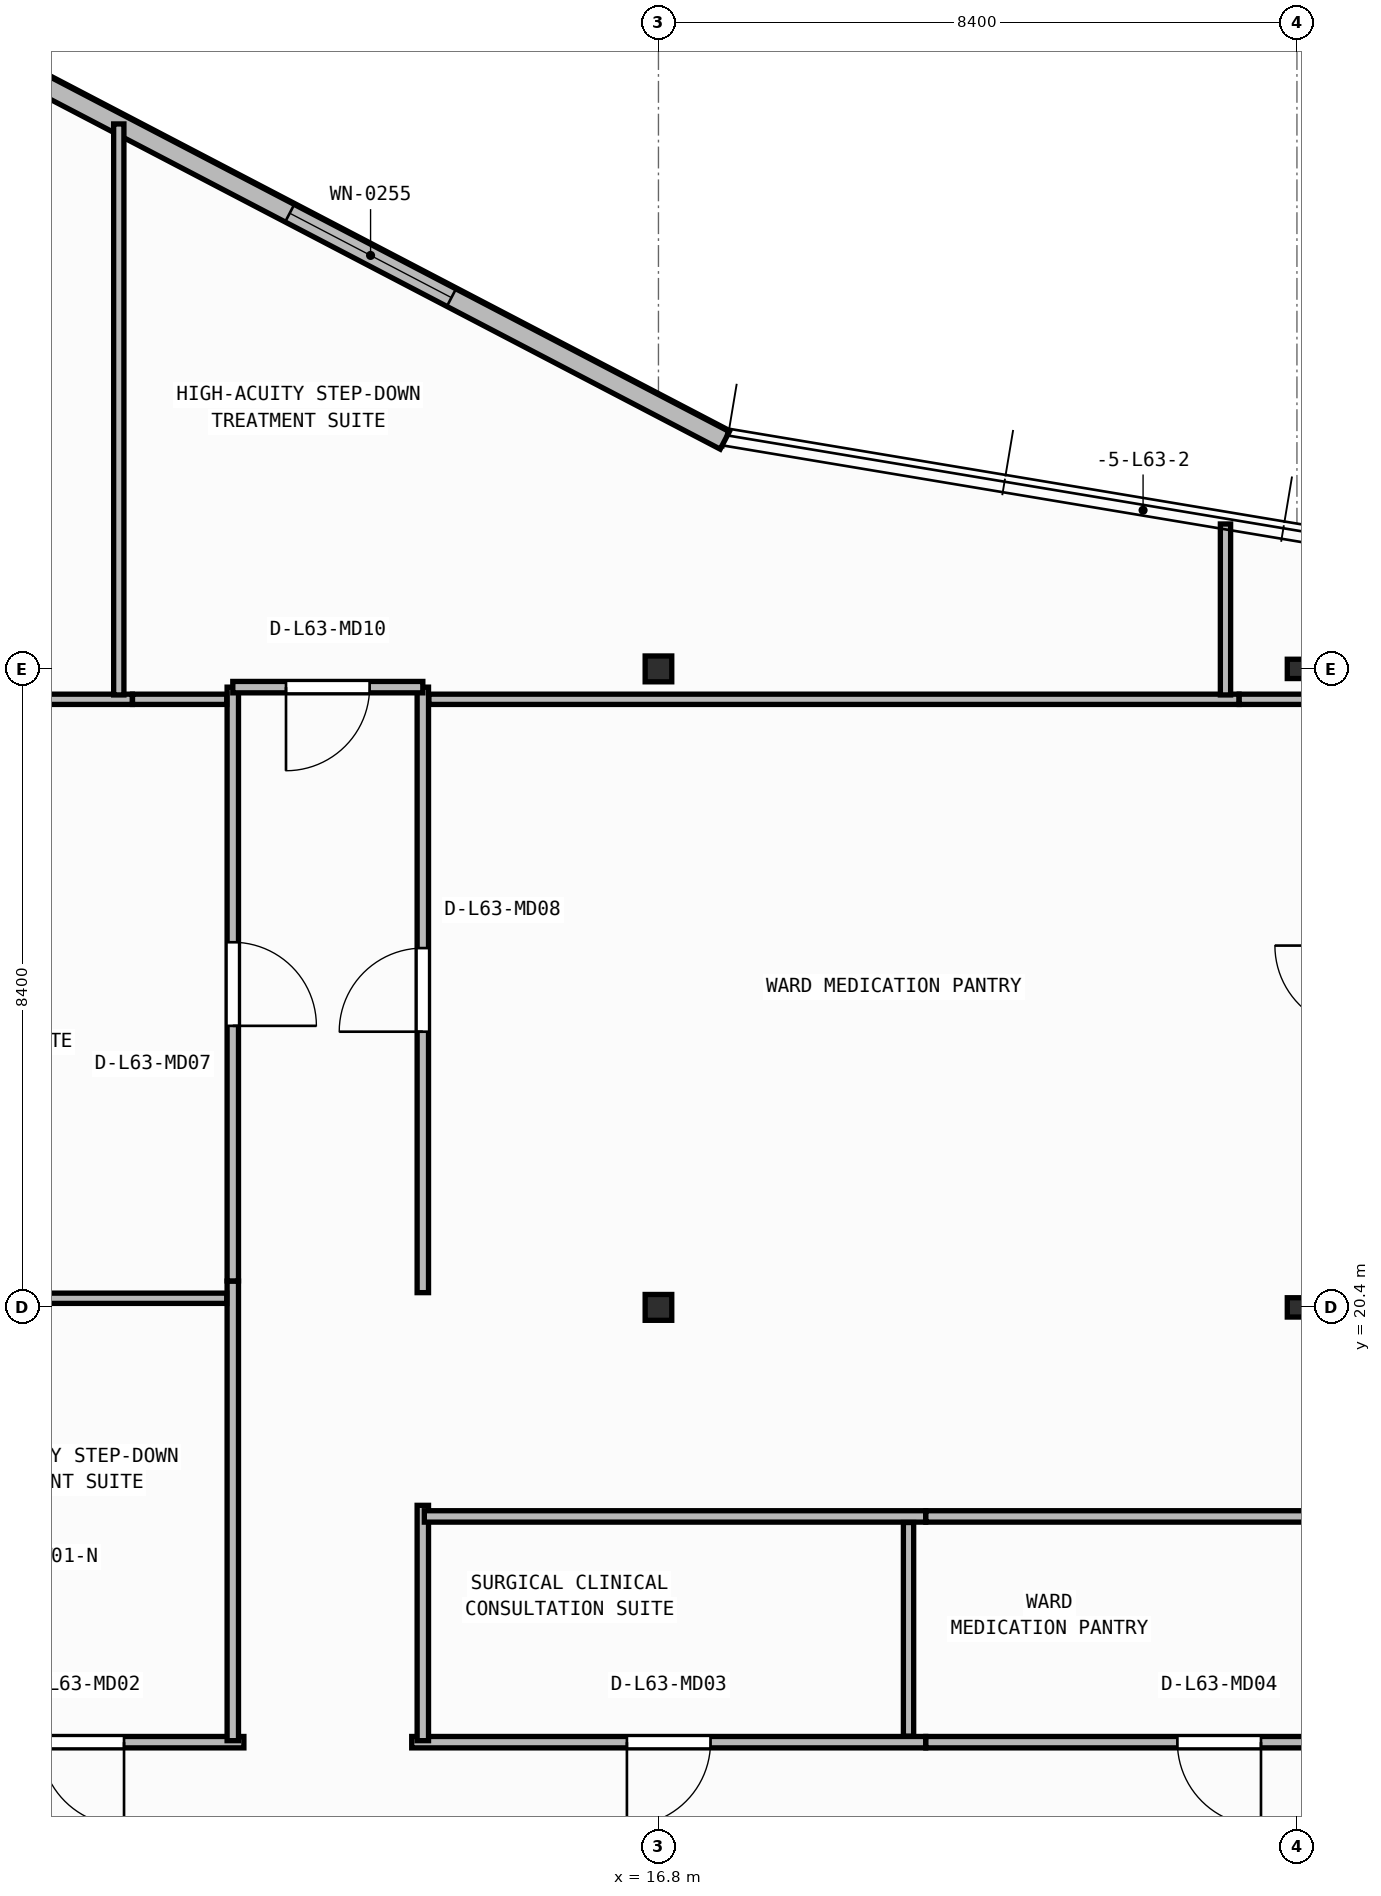
"""IFC4 building model, lengths in metres.
Left out: names, types, materials, properties, quantities, classifications, styles, units other than length and angle.
Written with IfcOpenShell. Run it as: python <this file> out.ifc"""

import sys

from ifc_helpers import new_model, si_unit, direction, frame, frame_2d, origin, origin_2d, place, context, subcontext, project, spatial, rectangle, i_section, extrude, element, fill, save


model = new_model("IFC4")
c1 = context("Model", 3, precision=1e-05, world=origin(), true_north=direction((0.0, 1.0)))
c2 = subcontext(c1, "Body", "Model", "MODEL_VIEW")
j1 = project(units=[si_unit("LENGTHUNIT", "METRE"), si_unit("PLANEANGLEUNIT", "RADIAN")], contexts=[c1])
p1 = place(None, origin())
s1 = spatial("IfcSite", under=j1, at=p1, CompositionType="ELEMENT")
p2 = place(p1, origin())
s2 = spatial("IfcBuilding", under=s1, at=p2, CompositionType="ELEMENT")
p3 = place(p2, frame((0.0, 0.0, 256.55)))
s3 = spatial("IfcBuildingStorey", under=s2, at=p3, CompositionType="ELEMENT", Elevation=256.55)
p4 = place(p3, frame((16.8, 20.4, 0.0), z_axis=(0.0, 0.0, 1.0), x_axis=(1.0, 0.0, 0.0)))
e1 = element("IfcColumn", 1, at=p4, inside=s3, PredefinedType="COLUMN", context=c2, shape_type="SweptSolid", body=[
    extrude(i_section(OverallWidth=0.35, OverallDepth=0.34, WebThickness=0.016, FlangeThickness=0.028, at=origin_2d()), origin(), (0.0, 0.0, 1.0), 3.95),
])
p5 = place(p3, frame((25.2, 20.4, 0.0), z_axis=(0.0, 0.0, 1.0), x_axis=(1.0, 0.0, 0.0)))
e2 = element("IfcColumn", 2, at=p5, inside=s3, PredefinedType="COLUMN", context=c2, shape_type="SweptSolid", body=[
    extrude(i_section(OverallWidth=0.254, OverallDepth=0.254, WebThickness=0.009, FlangeThickness=0.014, FilletRadius=0.013, at=origin_2d()), origin(), (0.0, 0.0, 1.0), 3.95),
])
p6 = place(p3, frame((16.8, 28.8, 0.0), z_axis=(0.0, 0.0, 1.0), x_axis=(1.0, 0.0, 0.0)))
e3 = element("IfcColumn", 3, at=p6, inside=s3, PredefinedType="COLUMN", context=c2, shape_type="SweptSolid", body=[
    extrude(i_section(OverallWidth=0.35, OverallDepth=0.34, WebThickness=0.016, FlangeThickness=0.028, at=origin_2d()), origin(), (0.0, 0.0, 1.0), 3.95),
])
p7 = place(p3, frame((25.2, 28.8, 0.0), z_axis=(0.0, 0.0, 1.0), x_axis=(1.0, 0.0, 0.0)))
e4 = element("IfcColumn", 4, at=p7, inside=s3, PredefinedType="COLUMN", context=c2, shape_type="SweptSolid", body=[
    extrude(i_section(OverallWidth=0.254, OverallDepth=0.254, WebThickness=0.009, FlangeThickness=0.014, FilletRadius=0.013, at=origin_2d()), origin(), (0.0, 0.0, 1.0), 3.95),
])
p8 = place(p3, frame((17.673, 31.806, 0.0), z_axis=(0.0, 0.0, 1.0), x_axis=(-0.886426635565, 0.462869117311, 0.0)))
e5 = element("IfcWall", 5, at=p8, inside=s3, PredefinedType="STANDARD", context=c2, shape_type="SweptSolid", body=[
    extrude(rectangle(XDim=10.514, YDim=0.26, at=frame_2d((5.257, 0.0))), origin(), (0.0, 0.0, 1.0), 3.71),
])
p9 = place(p8, frame((4.057, 0.0, 0.9)))
e6 = element("IfcOpeningElement", 6, at=p9, cuts=e5, PredefinedType="OPENING", context=c2, shape_type="SweptSolid", body=[
    extrude(rectangle(XDim=2.4, YDim=1.65, at=frame_2d((1.2, 0.825))), frame((0.0, 0.14, 0.0), z_axis=(0.0, -1.0, 0.0), x_axis=(1.0, 0.0, 0.0)), (0.0, 0.0, 1.0), 0.28),
])
p10 = place(p3, frame((11.346, 14.68, 0.0), z_axis=(0.0, 0.0, 1.0), x_axis=(-1.0, 0.0, 0.0)))
e7 = element("IfcWall", 7, at=p10, inside=s3, PredefinedType="PARTITIONING", context=c2, shape_type="SweptSolid", body=[
    extrude(rectangle(XDim=4.254, YDim=0.15, at=frame_2d((2.127, 0.0))), origin(), (0.0, 0.0, 1.0), 3.71),
])
p11 = place(p10, frame((1.577, 0.0, 0.0)))
e8 = element("IfcOpeningElement", 8, at=p11, cuts=e7, PredefinedType="OPENING", context=c2, shape_type="SweptSolid", body=[
    extrude(rectangle(XDim=1.1, YDim=2.1, at=frame_2d((0.55, 1.05))), frame((0.0, 0.085, 0.0), z_axis=(0.0, -1.0, 0.0), x_axis=(1.0, 0.0, 0.0)), (0.0, 0.0, 1.0), 0.17),
])
p12 = place(p3, frame((20.316, 14.68, 0.0), z_axis=(0.0, 0.0, 1.0), x_axis=(-1.0, 0.0, 0.0)))
e9 = element("IfcWall", 9, at=p12, inside=s3, PredefinedType="PARTITIONING", context=c2, shape_type="SweptSolid", body=[
    extrude(rectangle(XDim=6.762, YDim=0.15, at=frame_2d((3.381, 0.0))), origin(), (0.0, 0.0, 1.0), 3.71),
])
p13 = place(p12, frame((2.831, 0.0, 0.0)))
e10 = element("IfcOpeningElement", 10, at=p13, cuts=e9, PredefinedType="OPENING", context=c2, shape_type="SweptSolid", body=[
    extrude(rectangle(XDim=1.1, YDim=2.1, at=frame_2d((0.55, 1.05))), frame((0.0, 0.085, 0.0), z_axis=(0.0, -1.0, 0.0), x_axis=(1.0, 0.0, 0.0)), (0.0, 0.0, 1.0), 0.17),
])
p14 = place(p3, frame((28.036, 14.68, 0.0), z_axis=(0.0, 0.0, 1.0), x_axis=(-1.0, 0.0, 0.0)))
e11 = element("IfcWall", 11, at=p14, inside=s3, PredefinedType="PARTITIONING", context=c2, shape_type="SweptSolid", body=[
    extrude(rectangle(XDim=7.718, YDim=0.15, at=frame_2d((3.859, 0.0))), origin(), (0.0, 0.0, 1.0), 3.71),
])
p15 = place(p14, frame((3.309, 0.0, 0.0)))
e12 = element("IfcOpeningElement", 12, at=p15, cuts=e11, PredefinedType="OPENING", context=c2, shape_type="SweptSolid", body=[
    extrude(rectangle(XDim=1.1, YDim=2.1, at=frame_2d((0.55, 1.05))), frame((0.0, 0.085, 0.0), z_axis=(0.0, -1.0, 0.0), x_axis=(1.0, 0.0, 0.0)), (0.0, 0.0, 1.0), 0.17),
])
p16 = place(p3, frame((11.2, 20.746, 0.0), z_axis=(0.0, 0.0, 1.0), x_axis=(0.0, -1.0, 0.0)))
e13 = element("IfcWall", 13, at=p16, inside=s3, PredefinedType="PARTITIONING", context=c2, shape_type="SweptSolid", body=[
    extrude(rectangle(XDim=6.046, YDim=0.15, at=frame_2d((3.023, 0.0))), origin(), (0.0, 0.0, 1.0), 3.71),
])
p17 = place(p3, frame((13.7, 14.7, 0.0), z_axis=(0.0, 0.0, 1.0), x_axis=(0.0, 1.0, 0.0)))
e14 = element("IfcWall", 14, at=p17, inside=s3, PredefinedType="PARTITIONING", context=c2, shape_type="SweptSolid", body=[
    extrude(rectangle(XDim=3.096, YDim=0.15, at=frame_2d((1.548, 0.0))), origin(), (0.0, 0.0, 1.0), 3.71),
])
p18 = place(p3, frame((11.2, 28.56, 0.0), z_axis=(0.0, 0.0, 1.0), x_axis=(0.0, -1.0, 0.0)))
e15 = element("IfcWall", 15, at=p18, inside=s3, PredefinedType="PARTITIONING", context=c2, shape_type="SweptSolid", body=[
    extrude(rectangle(XDim=7.812, YDim=0.15, at=frame_2d((3.906, 0.0))), origin(), (0.0, 0.0, 1.0), 3.71),
])
p19 = place(p18, frame((3.356, 0.0, 0.0)))
e16 = element("IfcOpeningElement", 16, at=p19, cuts=e15, PredefinedType="OPENING", context=c2, shape_type="SweptSolid", body=[
    extrude(rectangle(XDim=1.1, YDim=2.1, at=frame_2d((0.55, 1.05))), frame((0.0, 0.085, 0.0), z_axis=(0.0, -1.0, 0.0), x_axis=(1.0, 0.0, 0.0)), (0.0, 0.0, 1.0), 0.17),
])
p20 = place(p3, frame((13.7, 20.594, 0.0), z_axis=(0.0, 0.0, 1.0), x_axis=(0.0, 1.0, 0.0)))
e17 = element("IfcWall", 17, at=p20, inside=s3, PredefinedType="PARTITIONING", context=c2, shape_type="SweptSolid", body=[
    extrude(rectangle(XDim=7.966, YDim=0.15, at=frame_2d((3.983, 0.0))), origin(), (0.0, 0.0, 1.0), 3.71),
])
p21 = place(p20, frame((3.433, 0.0, 0.0)))
e18 = element("IfcOpeningElement", 18, at=p21, cuts=e17, PredefinedType="OPENING", context=c2, shape_type="SweptSolid", body=[
    extrude(rectangle(XDim=1.1, YDim=2.1, at=frame_2d((0.55, 1.05))), frame((0.0, 0.085, 0.0), z_axis=(0.0, -1.0, 0.0), x_axis=(1.0, 0.0, 0.0)), (0.0, 0.0, 1.0), 0.17),
])
p22 = place(p3, frame((13.7, 28.56, 0.0), z_axis=(0.0, 0.0, 1.0), x_axis=(-1.0, 0.0, 0.0)))
e19 = element("IfcWall", 19, at=p22, inside=s3, PredefinedType="PARTITIONING", context=c2, shape_type="SweptSolid", body=[
    extrude(rectangle(XDim=2.5, YDim=0.15, at=frame_2d((1.25, 0.0))), origin(), (0.0, 0.0, 1.0), 3.157),
])
p23 = place(p22, frame((0.7, 0.0, 0.0)))
e20 = element("IfcOpeningElement", 20, at=p23, cuts=e19, PredefinedType="OPENING", context=c2, shape_type="SweptSolid", body=[
    extrude(rectangle(XDim=1.1, YDim=2.1, at=frame_2d((0.55, 1.05))), frame((0.0, 0.085, 0.0), z_axis=(0.0, -1.0, 0.0), x_axis=(1.0, 0.0, 0.0)), (0.0, 0.0, 1.0), 0.17),
])
p24 = place(p3, frame((13.72, 17.65, 0.0), z_axis=(0.0, 0.0, 1.0), x_axis=(1.0, 0.0, 0.0)))
e21 = element("IfcWall", 21, at=p24, inside=s3, PredefinedType="PARTITIONING", context=c2, shape_type="SweptSolid", body=[
    extrude(rectangle(XDim=6.596, YDim=0.15, at=frame_2d((3.298, 0.0))), origin(), (0.0, 0.0, 1.0), 3.71),
])
p25 = place(p3, frame((20.318, 17.65, 0.0), z_axis=(0.0, 0.0, 1.0), x_axis=(1.0, 0.0, 0.0)))
e22 = element("IfcWall", 22, at=p25, inside=s3, PredefinedType="PARTITIONING", context=c2, shape_type="SweptSolid", body=[
    extrude(rectangle(XDim=7.718, YDim=0.15, at=frame_2d((3.859, 0.0))), origin(), (0.0, 0.0, 1.0), 3.71),
])
p26 = place(p3, frame((11.12, 20.52, 0.0), z_axis=(0.0, 0.0, 1.0), x_axis=(-1.0, 0.0, 0.0)))
e23 = element("IfcWall", 23, at=p26, inside=s3, PredefinedType="PARTITIONING", context=c2, shape_type="SweptSolid", body=[
    extrude(rectangle(XDim=5.673, YDim=0.135, at=frame_2d((2.836, 0.0))), origin(), (0.0, 0.0, 1.0), 3.157),
])
p27 = place(p3, frame((20.09, 14.76, 0.0), z_axis=(0.0, 0.0, 1.0), x_axis=(0.0, 1.0, 0.0)))
e24 = element("IfcWall", 24, at=p27, inside=s3, PredefinedType="PARTITIONING", context=c2, shape_type="SweptSolid", body=[
    extrude(rectangle(XDim=2.81, YDim=0.135, at=frame_2d((1.405, 0.0))), origin(), (0.0, 0.0, 1.0), 3.71),
])
p28 = place(p3, frame((9.878, 28.4, 0.0), z_axis=(0.0, 0.0, 1.0), x_axis=(-1.0, 0.0, 0.0)))
e25 = element("IfcWall", 25, at=p28, inside=s3, PredefinedType="PARTITIONING", context=c2, shape_type="SweptSolid", body=[
    extrude(rectangle(XDim=9.638, YDim=0.135, at=frame_2d((4.819, 0.0))), origin(), (0.0, 0.0, 1.0), 3.157),
])
p29 = place(p28, frame((4.473, 0.0, 0.0)))
e26 = element("IfcOpeningElement", 26, at=p29, cuts=e25, PredefinedType="OPENING", context=c2, shape_type="SweptSolid", body=[
    extrude(rectangle(XDim=1.1, YDim=2.1, at=frame_2d((0.55, 1.05))), frame((0.0, 0.077, 0.0), z_axis=(0.0, -1.0, 0.0), x_axis=(1.0, 0.0, 0.0)), (0.0, 0.0, 1.0), 0.155),
])
p30 = place(p3, frame((11.12, 28.4, 0.0), z_axis=(0.0, 0.0, 1.0), x_axis=(-1.0, 0.0, 0.0)))
e27 = element("IfcWall", 27, at=p30, inside=s3, PredefinedType="PARTITIONING", context=c2, shape_type="SweptSolid", body=[
    extrude(rectangle(XDim=1.24, YDim=0.135, at=frame_2d((0.62, 0.0))), origin(), (0.0, 0.0, 1.0), 3.157),
])
p31 = place(p3, frame((24.438, 28.4, 0.0), z_axis=(0.0, 0.0, 1.0), x_axis=(-1.0, 0.0, 0.0)))
e28 = element("IfcWall", 28, at=p31, inside=s3, PredefinedType="PARTITIONING", context=c2, shape_type="SweptSolid", body=[
    extrude(rectangle(XDim=10.658, YDim=0.135, at=frame_2d((5.329, 0.0))), origin(), (0.0, 0.0, 1.0), 3.157),
])
p32 = place(p3, frame((26.01, 28.4, 0.0), z_axis=(0.0, 0.0, 1.0), x_axis=(-1.0, 0.0, 0.0)))
e29 = element("IfcWall", 29, at=p32, inside=s3, PredefinedType="PARTITIONING", context=c2, shape_type="SweptSolid", body=[
    extrude(rectangle(XDim=1.57, YDim=0.135, at=frame_2d((0.785, 0.0))), origin(), (0.0, 0.0, 1.0), 3.326),
])
p33 = place(p3, frame((9.7, 28.458, 0.0), z_axis=(0.0, 0.0, 1.0), x_axis=(0.0, 1.0, 0.0)))
e30 = element("IfcWall", 30, at=p33, inside=s3, PredefinedType="PARTITIONING", context=c2, shape_type="SweptSolid", body=[
    extrude(rectangle(XDim=7.512, YDim=0.135, at=frame_2d((3.756, 0.0))), origin(), (0.0, 0.0, 1.0), 3.71),
])
p34 = place(p3, frame((24.26, 28.458, 0.0), z_axis=(0.0, 0.0, 1.0), x_axis=(0.0, 1.0, 0.0)))
e31 = element("IfcWall", 31, at=p34, inside=s3, PredefinedType="PARTITIONING", context=c2, shape_type="SweptSolid", body=[
    extrude(rectangle(XDim=2.249, YDim=0.135, at=frame_2d((1.125, 0.0))), origin(), (0.0, 0.0, 1.0), 3.71),
])
p35 = place(p9, origin())
e32 = element("IfcWindow", 32, at=p35, inside=s3, PartitioningType="SINGLE_PANEL", PredefinedType="WINDOW", context=c2, shape_type="SweptSolid", body=[
    extrude(rectangle(XDim=2.4, YDim=1.65, at=frame_2d((1.2, 0.825))), frame((0.0, 0.03, 0.0), z_axis=(0.0, -1.0, 0.0), x_axis=(1.0, 0.0, 0.0)), (0.0, 0.0, 1.0), 0.06),
])
fill(e6, e32)
p36 = place(p11, origin())
e33 = element("IfcDoor", 33, at=p36, inside=s3, OperationType="SINGLE_SWING_LEFT", PredefinedType="DOOR", context=c2, shape_type="SweptSolid", body=[
    extrude(rectangle(XDim=1.1, YDim=2.1, at=frame_2d((0.55, 1.05))), frame((0.0, 0.025, 0.0), z_axis=(0.0, -1.0, 0.0), x_axis=(1.0, 0.0, 0.0)), (0.0, 0.0, 1.0), 0.05),
])
fill(e8, e33)
p37 = place(p13, origin())
e34 = element("IfcDoor", 34, at=p37, inside=s3, OperationType="SINGLE_SWING_RIGHT", PredefinedType="DOOR", context=c2, shape_type="SweptSolid", body=[
    extrude(rectangle(XDim=1.1, YDim=2.1, at=frame_2d((0.55, 1.05))), frame((0.0, 0.025, 0.0), z_axis=(0.0, -1.0, 0.0), x_axis=(1.0, 0.0, 0.0)), (0.0, 0.0, 1.0), 0.05),
])
fill(e10, e34)
p38 = place(p15, origin())
e35 = element("IfcDoor", 35, at=p38, inside=s3, OperationType="SINGLE_SWING_LEFT", PredefinedType="DOOR", context=c2, shape_type="SweptSolid", body=[
    extrude(rectangle(XDim=1.1, YDim=2.1, at=frame_2d((0.55, 1.05))), frame((0.0, 0.025, 0.0), z_axis=(0.0, -1.0, 0.0), x_axis=(1.0, 0.0, 0.0)), (0.0, 0.0, 1.0), 0.05),
])
fill(e12, e35)
p39 = place(p19, origin())
e36 = element("IfcDoor", 36, at=p39, inside=s3, OperationType="SINGLE_SWING_RIGHT", PredefinedType="DOOR", context=c2, shape_type="SweptSolid", body=[
    extrude(rectangle(XDim=1.1, YDim=2.1, at=frame_2d((0.55, 1.05))), frame((0.0, 0.025, 0.0), z_axis=(0.0, -1.0, 0.0), x_axis=(1.0, 0.0, 0.0)), (0.0, 0.0, 1.0), 0.05),
])
fill(e16, e36)
p40 = place(p21, origin())
e37 = element("IfcDoor", 37, at=p40, inside=s3, OperationType="SINGLE_SWING_LEFT", PredefinedType="DOOR", context=c2, shape_type="SweptSolid", body=[
    extrude(rectangle(XDim=1.1, YDim=2.1, at=frame_2d((0.55, 1.05))), frame((0.0, 0.025, 0.0), z_axis=(0.0, -1.0, 0.0), x_axis=(1.0, 0.0, 0.0)), (0.0, 0.0, 1.0), 0.05),
])
fill(e18, e37)
p41 = place(p23, origin())
e38 = element("IfcDoor", 38, at=p41, inside=s3, OperationType="SINGLE_SWING_RIGHT", PredefinedType="DOOR", context=c2, shape_type="SweptSolid", body=[
    extrude(rectangle(XDim=1.1, YDim=2.1, at=frame_2d((0.55, 1.05))), frame((0.0, 0.025, 0.0), z_axis=(0.0, -1.0, 0.0), x_axis=(1.0, 0.0, 0.0)), (0.0, 0.0, 1.0), 0.05),
])
fill(e20, e38)
save(model, sys.argv[1])
